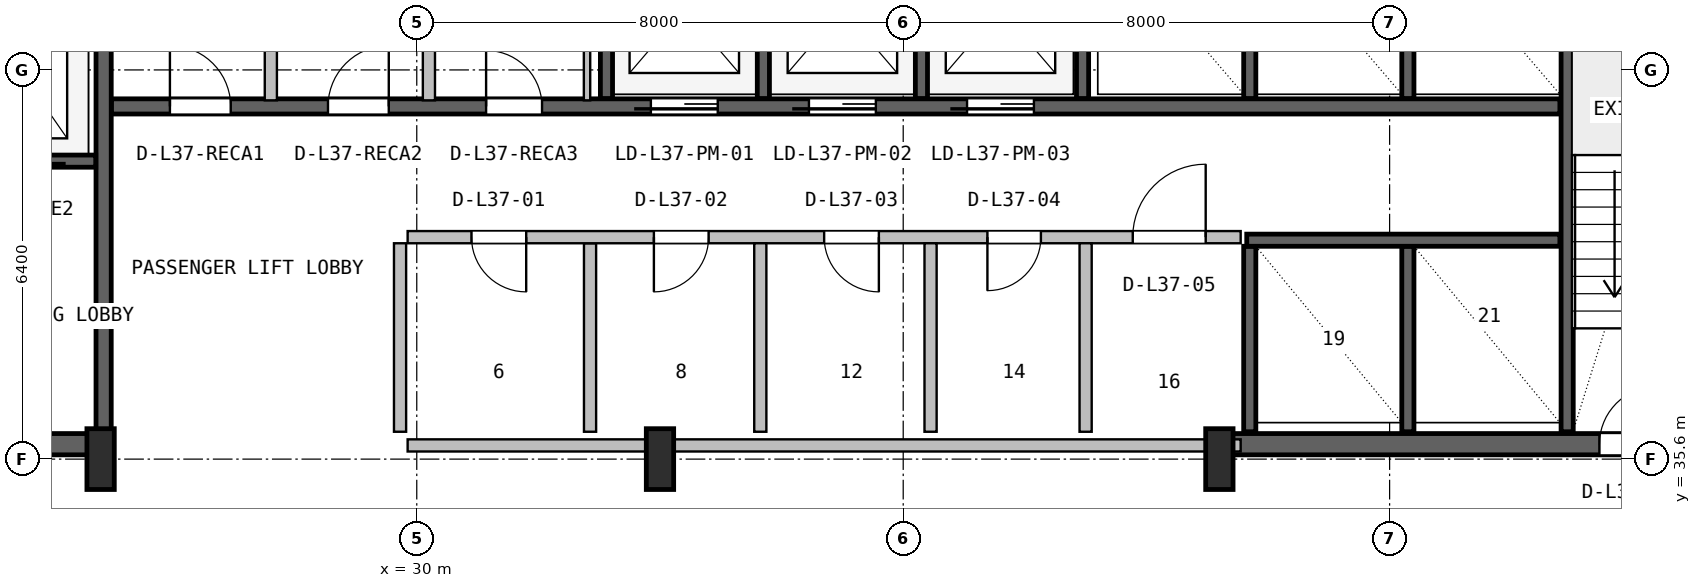
"""IFC4 building model, lengths in metres.
Left out: names, types, materials, properties, quantities, classifications, styles, units other than length and angle.
Written with IfcOpenShell. Run it as: python <this file> out.ifc"""

import sys

from ifc_helpers import new_model, si_unit, direction, frame, frame_2d, origin, origin_2d, place, context, subcontext, project, spatial, rectangle, i_section, extrude, source, transform, mapped, element, fill, save


model = new_model("IFC4")
c1 = context("Model", 3, precision=1e-05, world=origin(), true_north=direction((0.0, 1.0)))
c2 = subcontext(c1, "Body", "Model", "MODEL_VIEW")
j1 = project(units=[si_unit("LENGTHUNIT", "METRE"), si_unit("PLANEANGLEUNIT", "RADIAN")], contexts=[c1])
p1 = place(None, origin())
s1 = spatial("IfcSite", under=j1, at=p1, CompositionType="ELEMENT")
p2 = place(p1, origin())
s2 = spatial("IfcBuilding", under=s1, at=p2, CompositionType="ELEMENT")
p3 = place(p2, frame((0.0, 0.0, 153.4)))
s3 = spatial("IfcBuildingStorey", under=s2, at=p3, CompositionType="ELEMENT", Elevation=153.4)
p4 = place(p3, frame((15.67, 35.845, 0.0), z_axis=(0.0, 0.0, 1.0), x_axis=(1.0, 0.0, 0.0)))
e1 = element("IfcWall", 1, at=p4, inside=s3, PredefinedType="SHEAR", context=c2, shape_type="SweptSolid", body=[
    extrude(rectangle(XDim=9.13, YDim=0.35, at=frame_2d((4.565, 0.0))), origin(), (0.0, 0.0, 1.0), 3.55),
])
p5 = place(p4, frame((5.4, 0.0, 0.0)))
e2 = element("IfcOpeningElement", 2, at=p5, cuts=e1, PredefinedType="OPENING", context=c2, shape_type="SweptSolid", body=[
    extrude(rectangle(XDim=1.0, YDim=2.1, at=frame_2d((0.5, 1.05))), frame((0.0, 0.185, 0.0), z_axis=(0.0, -1.0, 0.0), x_axis=(1.0, 0.0, 0.0)), (0.0, 0.0, 1.0), 0.37),
])
p6 = place(p3, frame((43.2, 35.845, 0.0), z_axis=(0.0, 0.0, 1.0), x_axis=(1.0, 0.0, 0.0)))
e3 = element("IfcWall", 3, at=p6, inside=s3, PredefinedType="SHEAR", context=c2, shape_type="SweptSolid", body=[
    extrude(rectangle(XDim=9.13, YDim=0.35, at=frame_2d((4.565, 0.0))), origin(), (0.0, 0.0, 1.0), 3.55),
])
p7 = place(p6, frame((6.25, 0.0, 0.0)))
e4 = element("IfcOpeningElement", 4, at=p7, cuts=e3, PredefinedType="OPENING", context=c2, shape_type="SweptSolid", body=[
    extrude(rectangle(XDim=0.95, YDim=2.1, at=frame_2d((0.475, 1.05))), frame((0.0, 0.185, 0.0), z_axis=(0.0, -1.0, 0.0), x_axis=(1.0, 0.0, 0.0)), (0.0, 0.0, 1.0), 0.37),
])
m1 = source(origin(), c2, "Body", "SweptSolid", [
    extrude(i_section(OverallWidth=0.45, OverallDepth=1.0, WebThickness=0.016, FlangeThickness=0.03, FilletRadius=0.016, at=origin_2d()), origin(), (0.0, 0.0, 1.0), 3.8),
])
for number, where, z_axis, x_axis in (
    (5, (24.8, 35.6, 0.0), (0.0, 0.0, 1.0), (1.0, 0.0, 0.0)),
    (6, (34.0, 35.6, 0.0), (0.0, 0.0, 1.0), (1.0, 0.0, 0.0)),
    (7, (43.2, 35.6, 0.0), (0.0, 0.0, 1.0), (1.0, 0.0, 0.0)),
):
    element("IfcColumn", number, at=place(p3, frame(where, z_axis=z_axis, x_axis=x_axis)), inside=s3, PredefinedType="COLUMN", context=c2, shape_type="MappedRepresentation", body=[
        mapped(m1, transform((0.0, 0.0, 0.0), x_axis=(1.0, 0.0, 0.0), y_axis=(0.0, 1.0, 0.0), z_axis=(0.0, 0.0, 1.0), scale=1.0)),
    ])
p8 = place(p3, frame((24.85, 36.05, 0.0), z_axis=(0.0, 0.0, 1.0), x_axis=(0.0, 1.0, 0.0)))
e8 = element("IfcWall", 8, at=p8, inside=s3, PredefinedType="SHEAR", context=c2, shape_type="SweptSolid", body=[
    extrude(rectangle(XDim=10.45, YDim=0.25, at=frame_2d((5.225, 0.0))), origin(), (0.0, 0.0, 1.0), 3.55),
])
p9 = place(p3, frame((19.2, 40.5, 0.0), z_axis=(0.0, 0.0, 1.0), x_axis=(1.0, 0.0, 0.0)))
e9 = element("IfcWall", 9, at=p9, inside=s3, PredefinedType="SHEAR", context=c2, shape_type="SweptSolid", body=[
    extrude(rectangle(XDim=5.52, YDim=0.2, at=frame_2d((2.76, 0.0))), origin(), (0.0, 0.0, 1.0), 3.55),
])
p10 = place(p9, frame((1.05, 0.0, 0.0)))
e10 = element("IfcOpeningElement", 10, at=p10, cuts=e9, PredefinedType="OPENING", context=c2, shape_type="SweptSolid", body=[
    extrude(rectangle(XDim=1.1, YDim=2.18, at=frame_2d((0.55, 1.09))), frame((0.0, 0.11, 0.0), z_axis=(0.0, -1.0, 0.0), x_axis=(1.0, 0.0, 0.0)), (0.0, 0.0, 1.0), 0.22),
])
p11 = place(p9, frame((3.65, 0.0, 0.0)))
e11 = element("IfcOpeningElement", 11, at=p11, cuts=e9, PredefinedType="OPENING", context=c2, shape_type="SweptSolid", body=[
    extrude(rectangle(XDim=1.1, YDim=2.18, at=frame_2d((0.55, 1.09))), frame((0.0, 0.11, 0.0), z_axis=(0.0, -1.0, 0.0), x_axis=(1.0, 0.0, 0.0)), (0.0, 0.0, 1.0), 0.22),
])
p12 = place(p3, frame((48.92, 36.05, 0.0), z_axis=(0.0, 0.0, 1.0), x_axis=(0.0, 1.0, 0.0)))
e12 = element("IfcWall", 12, at=p12, inside=s3, PredefinedType="SHEAR", context=c2, shape_type="SweptSolid", body=[
    extrude(rectangle(XDim=10.5, YDim=0.2, at=frame_2d((5.25, 0.0))), origin(), (0.0, 0.0, 1.0), 3.55),
])
p13 = place(p3, frame((24.98, 41.4, 0.0), z_axis=(0.0, 0.0, 1.0), x_axis=(1.0, 0.0, 0.0)))
e13 = element("IfcWall", 13, at=p13, inside=s3, PredefinedType="SHEAR", context=c2, shape_type="SweptSolid", body=[
    extrude(rectangle(XDim=23.82, YDim=0.25, at=frame_2d((11.91, 0.0))), origin(), (0.0, 0.0, 1.0), 3.55),
])
p14 = place(p13, frame((8.87, 0.0, 0.0)))
e14 = element("IfcOpeningElement", 14, at=p14, cuts=e13, PredefinedType="OPENING", context=c2, shape_type="SweptSolid", body=[
    extrude(rectangle(XDim=1.1, YDim=2.18, at=frame_2d((0.55, 1.09))), frame((0.0, 0.135, 0.0), z_axis=(0.0, -1.0, 0.0), x_axis=(1.0, 0.0, 0.0)), (0.0, 0.0, 1.0), 0.27),
])
p15 = place(p13, frame((11.47, 0.0, 0.0)))
e15 = element("IfcOpeningElement", 15, at=p15, cuts=e13, PredefinedType="OPENING", context=c2, shape_type="SweptSolid", body=[
    extrude(rectangle(XDim=1.1, YDim=2.18, at=frame_2d((0.55, 1.09))), frame((0.0, 0.135, 0.0), z_axis=(0.0, -1.0, 0.0), x_axis=(1.0, 0.0, 0.0)), (0.0, 0.0, 1.0), 0.27),
])
p16 = place(p13, frame((14.07, 0.0, 0.0)))
e16 = element("IfcOpeningElement", 16, at=p16, cuts=e13, PredefinedType="OPENING", context=c2, shape_type="SweptSolid", body=[
    extrude(rectangle(XDim=1.1, YDim=2.18, at=frame_2d((0.55, 1.09))), frame((0.0, 0.135, 0.0), z_axis=(0.0, -1.0, 0.0), x_axis=(1.0, 0.0, 0.0)), (0.0, 0.0, 1.0), 0.27),
])
p17 = place(p13, frame((0.96, 0.0, 0.0)))
e17 = element("IfcOpeningElement", 17, at=p17, cuts=e13, PredefinedType="OPENING", context=c2, shape_type="SweptSolid", body=[
    extrude(rectangle(XDim=1.0, YDim=2.08, at=frame_2d((0.5, 1.04))), frame((0.0, 0.135, 0.0), z_axis=(0.0, -1.0, 0.0), x_axis=(1.0, 0.0, 0.0)), (0.0, 0.0, 1.0), 0.27),
])
p18 = place(p13, frame((3.56, 0.0, 0.0)))
e18 = element("IfcOpeningElement", 18, at=p18, cuts=e13, PredefinedType="OPENING", context=c2, shape_type="SweptSolid", body=[
    extrude(rectangle(XDim=1.0, YDim=2.08, at=frame_2d((0.5, 1.04))), frame((0.0, 0.135, 0.0), z_axis=(0.0, -1.0, 0.0), x_axis=(1.0, 0.0, 0.0)), (0.0, 0.0, 1.0), 0.27),
])
p19 = place(p13, frame((6.16, 0.0, 0.0)))
e19 = element("IfcOpeningElement", 19, at=p19, cuts=e13, PredefinedType="OPENING", context=c2, shape_type="SweptSolid", body=[
    extrude(rectangle(XDim=0.92, YDim=2.08, at=frame_2d((0.46, 1.04))), frame((0.0, 0.135, 0.0), z_axis=(0.0, -1.0, 0.0), x_axis=(1.0, 0.0, 0.0)), (0.0, 0.0, 1.0), 0.27),
])
p20 = place(p3, frame((33.12, 41.53, 0.0), z_axis=(0.0, 0.0, 1.0), x_axis=(0.0, 1.0, 0.0)))
e20 = element("IfcWall", 20, at=p20, inside=s3, PredefinedType="SHEAR", context=c2, shape_type="SweptSolid", body=[
    extrude(rectangle(XDim=5.02, YDim=0.2, at=frame_2d((2.51, 0.0))), origin(), (0.0, 0.0, 1.0), 3.55),
])
for number, where, z_axis, x_axis in (
    (21, (35.7, 41.53, 0.0), (0.0, 0.0, 1.0), (0.0, 1.0, 0.0)),
    (22, (38.3, 41.53, 0.0), (0.0, 0.0, 1.0), (0.0, 1.0, 0.0)),
):
    element("IfcWall", number, at=place(p3, frame(where, z_axis=z_axis, x_axis=x_axis)), inside=s3, PredefinedType="SHEAR", context=c2, shape_type="SweptSolid", body=[
        extrude(rectangle(XDim=2.87, YDim=0.2, at=frame_2d((1.435, 0.0))), origin(), (0.0, 0.0, 1.0), 3.55),
    ])
p21 = place(p3, frame((40.95, 41.53, 0.0), z_axis=(0.0, 0.0, 1.0), x_axis=(0.0, 1.0, 0.0)))
e23 = element("IfcWall", 23, at=p21, inside=s3, PredefinedType="SHEAR", context=c2, shape_type="SweptSolid", body=[
    extrude(rectangle(XDim=5.02, YDim=0.2, at=frame_2d((2.51, 0.0))), origin(), (0.0, 0.0, 1.0), 3.55),
])
for number, where, z_axis, x_axis in (
    (24, (43.7, 41.53, 0.0), (0.0, 0.0, 1.0), (0.0, 1.0, 0.0)),
    (25, (46.3, 41.53, 0.0), (0.0, 0.0, 1.0), (0.0, 1.0, 0.0)),
):
    element("IfcWall", number, at=place(p3, frame(where, z_axis=z_axis, x_axis=x_axis)), inside=s3, PredefinedType="SHEAR", context=c2, shape_type="SweptSolid", body=[
        extrude(rectangle(XDim=2.87, YDim=0.2, at=frame_2d((1.435, 0.0))), origin(), (0.0, 0.0, 1.0), 3.55),
    ])
for number, where, z_axis, x_axis in (
    (26, (43.7, 36.05, 0.0), (0.0, 0.0, 1.0), (0.0, 1.0, 0.0)),
    (27, (46.3, 36.05, 0.0), (0.0, 0.0, 1.0), (0.0, 1.0, 0.0)),
):
    element("IfcWall", number, at=place(p3, frame(where, z_axis=z_axis, x_axis=x_axis)), inside=s3, PredefinedType="SHEAR", context=c2, shape_type="SweptSolid", body=[
        extrude(rectangle(XDim=3.05, YDim=0.2, at=frame_2d((1.525, 0.0))), origin(), (0.0, 0.0, 1.0), 3.55),
    ])
p22 = place(p3, frame((43.65, 39.2, 0.0), z_axis=(0.0, 0.0, 1.0), x_axis=(1.0, 0.0, 0.0)))
e28 = element("IfcWall", 28, at=p22, inside=s3, PredefinedType="SHEAR", context=c2, shape_type="SweptSolid", body=[
    extrude(rectangle(XDim=5.15, YDim=0.2, at=frame_2d((2.575, 0.0))), origin(), (0.0, 0.0, 1.0), 3.55),
])
p23 = place(p3, frame((29.85, 35.825, 0.0), z_axis=(0.0, 0.0, 1.0), x_axis=(1.0, 0.0, 0.0)))
e29 = element("IfcWall", 29, at=p23, inside=s3, PredefinedType="SOLIDWALL", context=c2, shape_type="SweptSolid", body=[
    extrude(rectangle(XDim=13.7, YDim=0.2, at=frame_2d((6.85, 0.0))), origin(), (0.0, 0.0, 1.0), 2.575),
])
p24 = place(p3, frame((32.85, 36.05, 0.0), z_axis=(0.0, 0.0, 1.0), x_axis=(0.0, 1.0, 0.0)))
e30 = element("IfcWall", 30, at=p24, inside=s3, PredefinedType="PLUMBINGWALL", context=c2, shape_type="SweptSolid", body=[
    extrude(rectangle(XDim=3.1, YDim=0.2, at=frame_2d((1.55, 0.0))), origin(), (0.0, 0.0, 1.0), 3.53),
])
p25 = place(p3, frame((29.85, 39.25, 0.0), z_axis=(0.0, 0.0, 1.0), x_axis=(1.0, 0.0, 0.0)))
e31 = element("IfcWall", 31, at=p25, inside=s3, PredefinedType="SOLIDWALL", context=c2, shape_type="SweptSolid", body=[
    extrude(rectangle(XDim=13.7, YDim=0.2, at=frame_2d((6.85, 0.0))), origin(), (0.0, 0.0, 1.0), 3.53),
])
p26 = place(p25, frame((1.05, 0.0, 0.0)))
e32 = element("IfcOpeningElement", 32, at=p26, cuts=e31, PredefinedType="OPENING", context=c2, shape_type="SweptSolid", body=[
    extrude(rectangle(XDim=0.9, YDim=2.06, at=frame_2d((0.45, 1.03))), frame((0.0, 0.11, 0.0), z_axis=(0.0, -1.0, 0.0), x_axis=(1.0, 0.0, 0.0)), (0.0, 0.0, 1.0), 0.22),
])
p27 = place(p25, frame((4.05, 0.0, 0.0)))
e33 = element("IfcOpeningElement", 33, at=p27, cuts=e31, PredefinedType="OPENING", context=c2, shape_type="SweptSolid", body=[
    extrude(rectangle(XDim=0.9, YDim=2.06, at=frame_2d((0.45, 1.03))), frame((0.0, 0.11, 0.0), z_axis=(0.0, -1.0, 0.0), x_axis=(1.0, 0.0, 0.0)), (0.0, 0.0, 1.0), 0.22),
])
p28 = place(p25, frame((6.85, 0.0, 0.0)))
e34 = element("IfcOpeningElement", 34, at=p28, cuts=e31, PredefinedType="OPENING", context=c2, shape_type="SweptSolid", body=[
    extrude(rectangle(XDim=0.9, YDim=2.06, at=frame_2d((0.45, 1.03))), frame((0.0, 0.11, 0.0), z_axis=(0.0, -1.0, 0.0), x_axis=(1.0, 0.0, 0.0)), (0.0, 0.0, 1.0), 0.22),
])
p29 = place(p25, frame((9.535, 0.0, 0.0)))
e35 = element("IfcOpeningElement", 35, at=p29, cuts=e31, PredefinedType="OPENING", context=c2, shape_type="SweptSolid", body=[
    extrude(rectangle(XDim=0.88, YDim=2.06, at=frame_2d((0.44, 1.03))), frame((0.0, 0.11, 0.0), z_axis=(0.0, -1.0, 0.0), x_axis=(1.0, 0.0, 0.0)), (0.0, 0.0, 1.0), 0.22),
])
p30 = place(p25, frame((11.925, 0.0, 0.0)))
e36 = element("IfcOpeningElement", 36, at=p30, cuts=e31, PredefinedType="OPENING", context=c2, shape_type="SweptSolid", body=[
    extrude(rectangle(XDim=1.2, YDim=2.1, at=frame_2d((0.6, 1.05))), frame((0.0, 0.11, 0.0), z_axis=(0.0, -1.0, 0.0), x_axis=(1.0, 0.0, 0.0)), (0.0, 0.0, 1.0), 0.22),
])
for number, where, z_axis, x_axis in (
    (37, (29.725, 36.05, 0.0), (0.0, 0.0, 1.0), (0.0, 1.0, 0.0)),
    (38, (35.65, 36.05, 0.0), (0.0, 0.0, 1.0), (0.0, 1.0, 0.0)),
    (39, (38.45, 36.05, 0.0), (0.0, 0.0, 1.0), (0.0, 1.0, 0.0)),
):
    element("IfcWall", number, at=place(p3, frame(where, z_axis=z_axis, x_axis=x_axis)), inside=s3, PredefinedType="PLUMBINGWALL", context=c2, shape_type="SweptSolid", body=[
        extrude(rectangle(XDim=3.1, YDim=0.2, at=frame_2d((1.55, 0.0))), origin(), (0.0, 0.0, 1.0), 3.53),
    ])
p31 = place(p3, frame((41.0, 36.05, 0.0), z_axis=(0.0, 0.0, 1.0), x_axis=(0.0, 1.0, 0.0)))
e40 = element("IfcWall", 40, at=p31, inside=s3, PredefinedType="SOLIDWALL", context=c2, shape_type="SweptSolid", body=[
    extrude(rectangle(XDim=3.1, YDim=0.2, at=frame_2d((1.55, 0.0))), origin(), (0.0, 0.0, 1.0), 3.53),
])
for number, where, z_axis, x_axis in (
    (41, (27.6, 41.5, 0.0), (0.0, 0.0, 1.0), (0.0, 1.0, 0.0)),
    (42, (30.2, 41.5, 0.0), (0.0, 0.0, 1.0), (0.0, 1.0, 0.0)),
):
    element("IfcWall", number, at=place(p3, frame(where, z_axis=z_axis, x_axis=x_axis)), inside=s3, PredefinedType="SOLIDWALL", context=c2, shape_type="SweptSolid", body=[
        extrude(rectangle(XDim=5.02, YDim=0.2, at=frame_2d((2.51, 0.0))), origin(), (0.0, 0.0, 1.0), 3.53),
    ])
p32 = place(p3, frame((32.8, 41.5, 0.0), z_axis=(0.0, 0.0, 1.0), x_axis=(0.0, 1.0, 0.0)))
e43 = element("IfcWall", 43, at=p32, inside=s3, PredefinedType="PARTITIONING", context=c2, shape_type="SweptSolid", body=[
    extrude(rectangle(XDim=5.02, YDim=0.105, at=frame_2d((2.51, 0.0))), origin(), (0.0, 0.0, 1.0), 3.53),
])
m2 = source(origin(), c2, "Body", "SweptSolid", [
    extrude(rectangle(XDim=0.95, YDim=2.1, at=frame_2d((0.475, 1.05))), frame((0.0, 0.025, 0.0), z_axis=(0.0, -1.0, 0.0), x_axis=(1.0, 0.0, 0.0)), (0.0, 0.0, 1.0), 0.05),
])
p33 = place(p7, origin())
e44 = element("IfcDoor", 44, at=p33, inside=s3, OperationType="SINGLE_SWING_RIGHT", PredefinedType="DOOR", context=c2, shape_type="MappedRepresentation", body=[
    mapped(m2, transform((0.0, 0.0, 0.0), x_axis=(1.0, 0.0, 0.0), y_axis=(0.0, 1.0, 0.0), z_axis=(0.0, 0.0, 1.0), scale=1.0)),
])
fill(e4, e44)
m3 = source(origin(), c2, "Body", "SweptSolid", [
    extrude(rectangle(XDim=1.1, YDim=2.18, at=frame_2d((0.55, 1.09))), frame((0.0, 0.025, 0.0), z_axis=(0.0, -1.0, 0.0), x_axis=(1.0, 0.0, 0.0)), (0.0, 0.0, 1.0), 0.05),
])
p34 = place(p14, frame((1.1, 0.0, 0.0), z_axis=(0.0, 0.0, 1.0), x_axis=(-1.0, 0.0, 0.0)))
e45 = element("IfcDoor", 45, at=p34, inside=s3, OperationType="SLIDING_TO_LEFT", PredefinedType="DOOR", context=c2, shape_type="MappedRepresentation", body=[
    mapped(m3, transform((0.0, 0.0, 0.0), x_axis=(1.0, 0.0, 0.0), y_axis=(0.0, 1.0, 0.0), z_axis=(0.0, 0.0, 1.0), scale=1.0)),
])
fill(e14, e45)
p35 = place(p15, frame((1.1, 0.0, 0.0), z_axis=(0.0, 0.0, 1.0), x_axis=(-1.0, 0.0, 0.0)))
e46 = element("IfcDoor", 46, at=p35, inside=s3, OperationType="SLIDING_TO_LEFT", PredefinedType="DOOR", context=c2, shape_type="MappedRepresentation", body=[
    mapped(m3, transform((0.0, 0.0, 0.0), x_axis=(1.0, 0.0, 0.0), y_axis=(0.0, 1.0, 0.0), z_axis=(0.0, 0.0, 1.0), scale=1.0)),
])
fill(e15, e46)
p36 = place(p16, frame((1.1, 0.0, 0.0), z_axis=(0.0, 0.0, 1.0), x_axis=(-1.0, 0.0, 0.0)))
e47 = element("IfcDoor", 47, at=p36, inside=s3, OperationType="SLIDING_TO_LEFT", PredefinedType="DOOR", context=c2, shape_type="MappedRepresentation", body=[
    mapped(m3, transform((0.0, 0.0, 0.0), x_axis=(1.0, 0.0, 0.0), y_axis=(0.0, 1.0, 0.0), z_axis=(0.0, 0.0, 1.0), scale=1.0)),
])
fill(e16, e47)
m4 = source(origin(), c2, "Body", "SweptSolid", [
    extrude(rectangle(XDim=1.0, YDim=2.08, at=frame_2d((0.5, 1.04))), frame((0.0, 0.025, 0.0), z_axis=(0.0, -1.0, 0.0), x_axis=(1.0, 0.0, 0.0)), (0.0, 0.0, 1.0), 0.05),
])
p37 = place(p17, origin())
e48 = element("IfcDoor", 48, at=p37, inside=s3, OperationType="SINGLE_SWING_LEFT", PredefinedType="DOOR", context=c2, shape_type="MappedRepresentation", body=[
    mapped(m4, transform((0.0, 0.0, 0.0), x_axis=(1.0, 0.0, 0.0), y_axis=(0.0, 1.0, 0.0), z_axis=(0.0, 0.0, 1.0), scale=1.0)),
])
fill(e17, e48)
p38 = place(p18, origin())
e49 = element("IfcDoor", 49, at=p38, inside=s3, OperationType="SINGLE_SWING_RIGHT", PredefinedType="DOOR", context=c2, shape_type="MappedRepresentation", body=[
    mapped(m4, transform((0.0, 0.0, 0.0), x_axis=(1.0, 0.0, 0.0), y_axis=(0.0, 1.0, 0.0), z_axis=(0.0, 0.0, 1.0), scale=1.0)),
])
fill(e18, e49)
m5 = source(origin(), c2, "Body", "SweptSolid", [
    extrude(rectangle(XDim=0.92, YDim=2.08, at=frame_2d((0.46, 1.04))), frame((0.0, 0.025, 0.0), z_axis=(0.0, -1.0, 0.0), x_axis=(1.0, 0.0, 0.0)), (0.0, 0.0, 1.0), 0.05),
])
p39 = place(p19, origin())
e50 = element("IfcDoor", 50, at=p39, inside=s3, OperationType="SINGLE_SWING_LEFT", PredefinedType="DOOR", context=c2, shape_type="MappedRepresentation", body=[
    mapped(m5, transform((0.0, 0.0, 0.0), x_axis=(1.0, 0.0, 0.0), y_axis=(0.0, 1.0, 0.0), z_axis=(0.0, 0.0, 1.0), scale=1.0)),
])
fill(e19, e50)
m6 = source(origin(), c2, "Body", "SweptSolid", [
    extrude(rectangle(XDim=0.9, YDim=2.06, at=frame_2d((0.45, 1.03))), frame((0.0, 0.025, 0.0), z_axis=(0.0, -1.0, 0.0), x_axis=(1.0, 0.0, 0.0)), (0.0, 0.0, 1.0), 0.05),
])
p40 = place(p26, frame((0.9, 0.0, 0.0), z_axis=(0.0, 0.0, 1.0), x_axis=(-1.0, 0.0, 0.0)))
e51 = element("IfcDoor", 51, at=p40, inside=s3, OperationType="SINGLE_SWING_RIGHT", PredefinedType="DOOR", context=c2, shape_type="MappedRepresentation", body=[
    mapped(m6, transform((0.0, 0.0, 0.0), x_axis=(1.0, 0.0, 0.0), y_axis=(0.0, 1.0, 0.0), z_axis=(0.0, 0.0, 1.0), scale=1.0)),
])
fill(e32, e51)
p41 = place(p27, frame((0.9, 0.0, 0.0), z_axis=(0.0, 0.0, 1.0), x_axis=(-1.0, 0.0, 0.0)))
e52 = element("IfcDoor", 52, at=p41, inside=s3, OperationType="SINGLE_SWING_LEFT", PredefinedType="DOOR", context=c2, shape_type="MappedRepresentation", body=[
    mapped(m6, transform((0.0, 0.0, 0.0), x_axis=(1.0, 0.0, 0.0), y_axis=(0.0, 1.0, 0.0), z_axis=(0.0, 0.0, 1.0), scale=1.0)),
])
fill(e33, e52)
p42 = place(p28, frame((0.9, 0.0, 0.0), z_axis=(0.0, 0.0, 1.0), x_axis=(-1.0, 0.0, 0.0)))
e53 = element("IfcDoor", 53, at=p42, inside=s3, OperationType="SINGLE_SWING_RIGHT", PredefinedType="DOOR", context=c2, shape_type="MappedRepresentation", body=[
    mapped(m6, transform((0.0, 0.0, 0.0), x_axis=(1.0, 0.0, 0.0), y_axis=(0.0, 1.0, 0.0), z_axis=(0.0, 0.0, 1.0), scale=1.0)),
])
fill(e34, e53)
m7 = source(origin(), c2, "Body", "SweptSolid", [
    extrude(rectangle(XDim=0.88, YDim=2.06, at=frame_2d((0.44, 1.03))), frame((0.0, 0.025, 0.0), z_axis=(0.0, -1.0, 0.0), x_axis=(1.0, 0.0, 0.0)), (0.0, 0.0, 1.0), 0.05),
])
p43 = place(p29, frame((0.88, 0.0, 0.0), z_axis=(0.0, 0.0, 1.0), x_axis=(-1.0, 0.0, 0.0)))
e54 = element("IfcDoor", 54, at=p43, inside=s3, OperationType="SINGLE_SWING_LEFT", PredefinedType="DOOR", context=c2, shape_type="MappedRepresentation", body=[
    mapped(m7, transform((0.0, 0.0, 0.0), x_axis=(1.0, 0.0, 0.0), y_axis=(0.0, 1.0, 0.0), z_axis=(0.0, 0.0, 1.0), scale=1.0)),
])
fill(e35, e54)
m8 = source(origin(), c2, "Body", "SweptSolid", [
    extrude(rectangle(XDim=1.2, YDim=2.1, at=frame_2d((0.6, 1.05))), frame((0.0, 0.025, 0.0), z_axis=(0.0, -1.0, 0.0), x_axis=(1.0, 0.0, 0.0)), (0.0, 0.0, 1.0), 0.05),
])
p44 = place(p30, origin())
e55 = element("IfcDoor", 55, at=p44, inside=s3, OperationType="SINGLE_SWING_RIGHT", PredefinedType="DOOR", context=c2, shape_type="MappedRepresentation", body=[
    mapped(m8, transform((0.0, 0.0, 0.0), x_axis=(1.0, 0.0, 0.0), y_axis=(0.0, 1.0, 0.0), z_axis=(0.0, 0.0, 1.0), scale=1.0)),
])
fill(e36, e55)
save(model, sys.argv[1])
